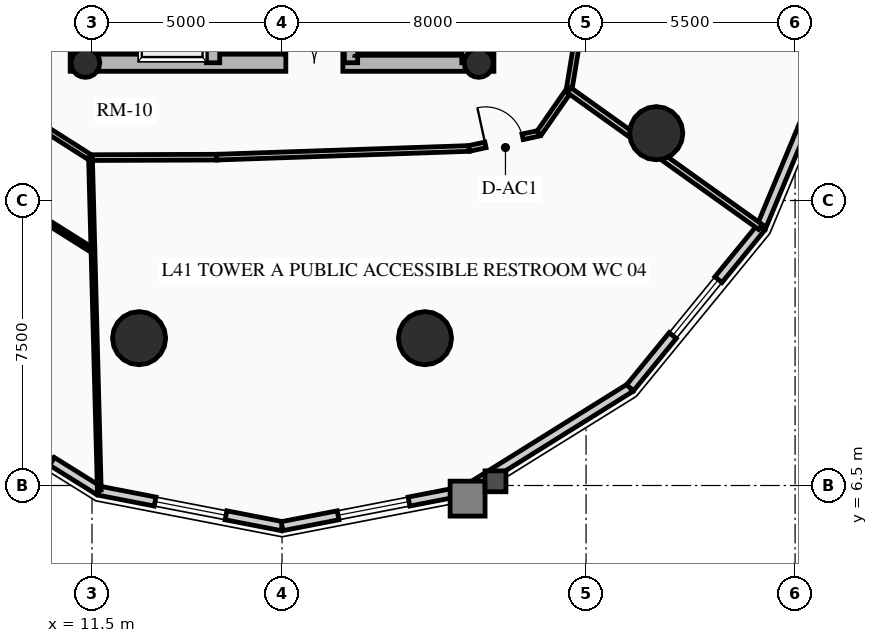
"""IFC4 building model, lengths in metres.
Left out: names, types, materials, properties, quantities, classifications, styles, units other than length and angle.
Written with IfcOpenShell. Run it as: python <this file> out.ifc"""

import sys

from ifc_helpers import new_model, si_unit, direction, frame, frame_2d, origin, origin_2d, place, context, subcontext, project, spatial, rectangle, circle, hollow_circle, extrude, source, transform, mapped, element, fill, save


model = new_model("IFC4")
c1 = context("Model", 3, precision=1e-05, world=origin(), true_north=direction((0.0, 1.0)))
c2 = subcontext(c1, "Body", "Model", "MODEL_VIEW")
j1 = project(units=[si_unit("LENGTHUNIT", "METRE"), si_unit("PLANEANGLEUNIT", "RADIAN")], contexts=[c1])
p1 = place(None, origin())
s1 = spatial("IfcSite", under=j1, at=p1, CompositionType="ELEMENT")
p2 = place(p1, origin())
s2 = spatial("IfcBuilding", under=s1, at=p2, CompositionType="ELEMENT")
p3 = place(p2, frame((0.0, 0.0, 129.16)))
s3 = spatial("IfcBuildingStorey", under=s2, at=p3, CompositionType="ELEMENT", Elevation=129.16)
for number, where, z_axis, x_axis in (
    (1, (11.15, 17.4, 0.0), (0.0, 0.0, 1.0), (0.0, 1.0, 0.0)),
    (2, (21.85, 17.4, 0.0), (0.0, 0.0, 1.0), (0.0, 1.0, 0.0)),
):
    element("IfcWall", number, at=place(p3, frame(where, z_axis=z_axis, x_axis=x_axis)), inside=s3, PredefinedType="SHEAR", context=c2, shape_type="SweptSolid", body=[
        extrude(rectangle(XDim=14.2, YDim=0.45, at=frame_2d((7.1, 0.0))), origin(), (0.0, 0.0, 1.0), 3.72),
    ])
p4 = place(p3, frame((11.15, 17.625, 0.0), z_axis=(0.0, 0.0, 1.0), x_axis=(1.0, 0.0, 0.0)))
e3 = element("IfcWall", 3, at=p4, inside=s3, PredefinedType="SHEAR", context=c2, shape_type="SweptSolid", body=[
    extrude(rectangle(XDim=10.7, YDim=0.45, at=frame_2d((5.35, 0.0))), origin(), (0.0, 0.0, 1.0), 3.72),
])
m1 = source(origin(), c2, "Body", "SweptSolid", [
    extrude(rectangle(XDim=1.5, YDim=2.02, at=frame_2d((0.75, 1.01))), frame((0.0, 0.235, 0.0), z_axis=(0.0, -1.0, 0.0), x_axis=(1.0, 0.0, 0.0)), (0.0, 0.0, 1.0), 0.47),
])
p5 = place(p4, frame((5.45, 0.0, 0.0)))
e4 = element("IfcOpeningElement", 4, at=p5, cuts=e3, PredefinedType="OPENING", context=c2, shape_type="MappedRepresentation", body=[
    mapped(m1, transform((0.0, 0.0, 0.0), x_axis=(1.0, 0.0, 0.0), y_axis=(0.0, 1.0, 0.0), z_axis=(0.0, 0.0, 1.0), scale=1.0)),
])
p6 = place(p3, frame((14.685, 17.625, 0.0), z_axis=(0.0, 0.0, 1.0), x_axis=(0.0, 1.0, 0.0)))
e5 = element("IfcWall", 5, at=p6, inside=s3, PredefinedType="SHEAR", context=c2, shape_type="SweptSolid", body=[
    extrude(rectangle(XDim=13.75, YDim=0.35, at=frame_2d((6.875, 0.0))), origin(), (0.0, 0.0, 1.0), 3.72),
])
m2 = source(origin(), c2, "Body", "SweptSolid", [
    extrude(rectangle(XDim=1.1, YDim=2.015, at=frame_2d((0.55, 1.007))), frame((0.0, 0.185, 0.0), z_axis=(0.0, -1.0, 0.0), x_axis=(1.0, 0.0, 0.0)), (0.0, 0.0, 1.0), 0.37),
])
p7 = place(p6, frame((4.875, 0.0, 0.0)))
e6 = element("IfcOpeningElement", 6, at=p7, cuts=e5, PredefinedType="OPENING", context=c2, shape_type="MappedRepresentation", body=[
    mapped(m2, transform((0.0, 0.0, 0.0), x_axis=(1.0, 0.0, 0.0), y_axis=(0.0, 1.0, 0.0), z_axis=(0.0, 0.0, 1.0), scale=1.0)),
])
p8 = place(p6, frame((0.65, 0.0, 0.0)))
e7 = element("IfcOpeningElement", 7, at=p8, cuts=e5, PredefinedType="OPENING", context=c2, shape_type="MappedRepresentation", body=[
    mapped(m2, transform((0.0, 0.0, 0.0), x_axis=(1.0, 0.0, 0.0), y_axis=(0.0, 1.0, 0.0), z_axis=(0.0, 0.0, 1.0), scale=1.0)),
])
p9 = place(p6, frame((2.65, 0.0, 0.0)))
e8 = element("IfcOpeningElement", 8, at=p9, cuts=e5, PredefinedType="OPENING", context=c2, shape_type="MappedRepresentation", body=[
    mapped(m2, transform((0.0, 0.0, 0.0), x_axis=(1.0, 0.0, 0.0), y_axis=(0.0, 1.0, 0.0), z_axis=(0.0, 0.0, 1.0), scale=1.0)),
])
m3 = source(origin(), c2, "Body", "SweptSolid", [
    extrude(rectangle(XDim=1.15, YDim=2.02, at=frame_2d((0.575, 1.01))), frame((0.0, 0.185, 0.0), z_axis=(0.0, -1.0, 0.0), x_axis=(1.0, 0.0, 0.0)), (0.0, 0.0, 1.0), 0.37),
])
p10 = place(p6, frame((7.295, 0.0, 0.0)))
e9 = element("IfcOpeningElement", 9, at=p10, cuts=e5, PredefinedType="OPENING", context=c2, shape_type="MappedRepresentation", body=[
    mapped(m3, transform((0.0, 0.0, 0.0), x_axis=(1.0, 0.0, 0.0), y_axis=(0.0, 1.0, 0.0), z_axis=(0.0, 0.0, 1.0), scale=1.0)),
])
p11 = place(p3, frame((18.315, 17.625, 0.0), z_axis=(0.0, 0.0, 1.0), x_axis=(0.0, 1.0, 0.0)))
e10 = element("IfcWall", 10, at=p11, inside=s3, PredefinedType="SHEAR", context=c2, shape_type="SweptSolid", body=[
    extrude(rectangle(XDim=13.75, YDim=0.35, at=frame_2d((6.875, 0.0))), origin(), (0.0, 0.0, 1.0), 3.72),
])
p12 = place(p11, frame((10.0, 0.0, 0.0)))
e11 = element("IfcOpeningElement", 11, at=p12, cuts=e10, PredefinedType="OPENING", context=c2, shape_type="MappedRepresentation", body=[
    mapped(m2, transform((0.0, 0.0, 0.0), x_axis=(1.0, 0.0, 0.0), y_axis=(0.0, 1.0, 0.0), z_axis=(0.0, 0.0, 1.0), scale=1.0)),
])
p13 = place(p11, frame((12.0, 0.0, 0.0)))
e12 = element("IfcOpeningElement", 12, at=p13, cuts=e10, PredefinedType="OPENING", context=c2, shape_type="MappedRepresentation", body=[
    mapped(m2, transform((0.0, 0.0, 0.0), x_axis=(1.0, 0.0, 0.0), y_axis=(0.0, 1.0, 0.0), z_axis=(0.0, 0.0, 1.0), scale=1.0)),
])
p14 = place(p11, frame((5.305, 0.0, 0.0)))
e13 = element("IfcOpeningElement", 13, at=p14, cuts=e10, PredefinedType="OPENING", context=c2, shape_type="MappedRepresentation", body=[
    mapped(m3, transform((0.0, 0.0, 0.0), x_axis=(1.0, 0.0, 0.0), y_axis=(0.0, 1.0, 0.0), z_axis=(0.0, 0.0, 1.0), scale=1.0)),
])
p15 = place(p3, frame((21.405, 17.625, 0.0), z_axis=(0.0, 0.0, 1.0), x_axis=(0.0, 1.0, 0.0)))
e14 = element("IfcWall", 14, at=p15, inside=s3, PredefinedType="SHEAR", context=c2, shape_type="SweptSolid", body=[
    extrude(rectangle(XDim=6.72, YDim=0.35, at=frame_2d((3.36, 0.0))), origin(), (0.0, 0.0, 1.0), 3.72),
])
for number, where, z_axis, x_axis in (
    (15, (11.325, 17.62, 0.0), (0.0, 0.0, 1.0), (1.0, 0.0, 0.0)),
    (16, (21.675, 17.62, 0.0), (0.0, 0.0, 1.0), (1.0, 0.0, 0.0)),
):
    element("IfcColumn", number, at=place(p3, frame(where, z_axis=z_axis, x_axis=x_axis)), inside=s3, PredefinedType="COLUMN", context=c2, shape_type="SweptSolid", body=[
        extrude(hollow_circle(Radius=0.38, WallThickness=0.032, at=origin_2d()), origin(), (0.0, 0.0, 1.0), 3.72),
    ])
for number, where, z_axis, x_axis in (
    (17, (12.739, 10.377, 0.0), (0.0, 0.0, 1.0), (1.0, 0.0, 0.0)),
    (18, (20.261, 10.377, 0.0), (0.0, 0.0, 1.0), (1.0, 0.0, 0.0)),
    (19, (26.347, 15.771, 0.0), (0.0, 0.0, 1.0), (1.0, 0.0, 0.0)),
):
    element("IfcColumn", number, at=place(p3, frame(where, z_axis=z_axis, x_axis=x_axis)), inside=s3, PredefinedType="USERDEFINED", context=c2, shape_type="SweptSolid", body=[
        extrude(circle(Radius=0.7, at=origin_2d()), origin(), (0.0, 0.0, 1.0), 3.72),
    ])
p16 = place(p3, frame((11.685, 6.363, 0.0), z_axis=(0.0, 0.0, 1.0), x_axis=(-0.848520380187, 0.529162701263, 0.0)))
e20 = element("IfcWall", 20, at=p16, inside=s3, PredefinedType="SOLIDWALL", context=c2, shape_type="SweptSolid", body=[
    extrude(rectangle(XDim=5.119, YDim=0.24, at=frame_2d((2.56, 0.0))), origin(), (0.0, 0.0, 1.0), 2.949),
])
m4 = source(origin(), c2, "Body", "SweptSolid", [
    extrude(rectangle(XDim=2.2, YDim=1.35, at=frame_2d((1.1, 0.675))), frame((0.0, 0.13, 0.0), z_axis=(0.0, -1.0, 0.0), x_axis=(1.0, 0.0, 0.0)), (0.0, 0.0, 1.0), 0.26),
])
p17 = place(p16, frame((1.459, 0.0, 0.65)))
e21 = element("IfcOpeningElement", 21, at=p17, cuts=e20, PredefinedType="OPENING", context=c2, shape_type="MappedRepresentation", body=[
    mapped(m4, transform((0.0, 0.0, 0.0), x_axis=(1.0, 0.0, 0.0), y_axis=(0.0, 1.0, 0.0), z_axis=(0.0, 0.0, 1.0), scale=1.0)),
])
p18 = place(p3, frame((16.5, 5.43, 0.0), z_axis=(0.0, 0.0, 1.0), x_axis=(-0.981723785992, 0.190311344954, 0.0)))
e22 = element("IfcWall", 22, at=p18, inside=s3, PredefinedType="SOLIDWALL", context=c2, shape_type="SweptSolid", body=[
    extrude(rectangle(XDim=4.904, YDim=0.24, at=frame_2d((2.452, 0.0))), origin(), (0.0, 0.0, 1.0), 2.949),
])
m5 = source(origin(), c2, "Body", "SweptSolid", [
    extrude(rectangle(XDim=1.9, YDim=1.35, at=frame_2d((0.95, 0.675))), frame((0.0, 0.13, 0.0), z_axis=(0.0, -1.0, 0.0), x_axis=(1.0, 0.0, 0.0)), (0.0, 0.0, 1.0), 0.26),
])
p19 = place(p18, frame((1.502, 0.0, 0.65)))
e23 = element("IfcOpeningElement", 23, at=p19, cuts=e22, PredefinedType="OPENING", context=c2, shape_type="MappedRepresentation", body=[
    mapped(m5, transform((0.0, 0.0, 0.0), x_axis=(1.0, 0.0, 0.0), y_axis=(0.0, 1.0, 0.0), z_axis=(0.0, 0.0, 1.0), scale=1.0)),
])
p20 = place(p3, frame((21.315, 6.363, 0.0), z_axis=(0.0, 0.0, 1.0), x_axis=(-0.981723785992, -0.190311344954, 0.0)))
e24 = element("IfcWall", 24, at=p20, inside=s3, PredefinedType="SOLIDWALL", context=c2, shape_type="SweptSolid", body=[
    extrude(rectangle(XDim=4.904, YDim=0.24, at=frame_2d((2.452, 0.0))), origin(), (0.0, 0.0, 1.0), 2.949),
])
p21 = place(p20, frame((1.502, 0.0, 0.65)))
e25 = element("IfcOpeningElement", 25, at=p21, cuts=e24, PredefinedType="OPENING", context=c2, shape_type="MappedRepresentation", body=[
    mapped(m5, transform((0.0, 0.0, 0.0), x_axis=(1.0, 0.0, 0.0), y_axis=(0.0, 1.0, 0.0), z_axis=(0.0, 0.0, 1.0), scale=1.0)),
])
p22 = place(p3, frame((25.658, 9.072, 0.0), z_axis=(0.0, 0.0, 1.0), x_axis=(-0.848520380187, -0.529162701263, 0.0)))
e26 = element("IfcWall", 26, at=p22, inside=s3, PredefinedType="SOLIDWALL", context=c2, shape_type="SweptSolid", body=[
    extrude(rectangle(XDim=5.119, YDim=0.24, at=frame_2d((2.56, 0.0))), origin(), (0.0, 0.0, 1.0), 2.949),
])
p23 = place(p3, frame((29.105, 13.291, 0.0), z_axis=(0.0, 0.0, 1.0), x_axis=(-0.632700781152, -0.77439635945, 0.0)))
e27 = element("IfcWall", 27, at=p23, inside=s3, PredefinedType="SOLIDWALL", context=c2, shape_type="SweptSolid", body=[
    extrude(rectangle(XDim=5.448, YDim=0.24, at=frame_2d((2.724, 0.0))), origin(), (0.0, 0.0, 1.0), 2.949),
])
p24 = place(p23, frame((1.774, 0.0, 0.65)))
e28 = element("IfcOpeningElement", 28, at=p24, cuts=e27, PredefinedType="OPENING", context=c2, shape_type="MappedRepresentation", body=[
    mapped(m5, transform((0.0, 0.0, 0.0), x_axis=(1.0, 0.0, 0.0), y_axis=(0.0, 1.0, 0.0), z_axis=(0.0, 0.0, 1.0), scale=1.0)),
])
p25 = place(p3, frame((31.318, 18.607, 0.0), z_axis=(0.0, 0.0, 1.0), x_axis=(-0.384344417632, -0.923189779317, 0.0)))
e29 = element("IfcWall", 29, at=p25, inside=s3, PredefinedType="SOLIDWALL", context=c2, shape_type="SweptSolid", body=[
    extrude(rectangle(XDim=5.758, YDim=0.24, at=frame_2d((2.879, 0.0))), origin(), (0.0, 0.0, 1.0), 2.949),
])
p26 = place(p3, frame((10.115, 15.983, 0.0), z_axis=(0.0, 0.0, 1.0), x_axis=(0.843995849351, -0.536349705209, 0.0)))
e30 = element("IfcWall", 30, at=p26, inside=s3, PredefinedType="PARTITIONING", context=c2, shape_type="SweptSolid", body=[
    extrude(rectangle(XDim=1.593, YDim=0.15, at=frame_2d((0.796, 0.0))), origin(), (0.0, 0.0, 1.0), 2.995),
])
p27 = place(p3, frame((11.46, 15.129, 0.0), z_axis=(0.0, 0.0, 1.0), x_axis=(0.999993513287, 0.003601858435, 0.0)))
e31 = element("IfcWall", 31, at=p27, inside=s3, PredefinedType="PARTITIONING", context=c2, shape_type="SweptSolid", body=[
    extrude(rectangle(XDim=3.321, YDim=0.15, at=frame_2d((1.661, 0.0))), origin(), (0.0, 0.0, 1.0), 2.995),
])
p28 = place(p3, frame((14.781, 15.141, 0.0), z_axis=(0.0, 0.0, 1.0), x_axis=(0.999407918707, 0.034406569513, 0.0)))
e32 = element("IfcWall", 32, at=p28, inside=s3, PredefinedType="PARTITIONING", context=c2, shape_type="SweptSolid", body=[
    extrude(rectangle(XDim=6.642, YDim=0.15, at=frame_2d((3.321, 0.0))), origin(), (0.0, 0.0, 1.0), 2.995),
])
p29 = place(p3, frame((21.419, 15.369, 0.0), z_axis=(0.0, 0.0, 1.0), x_axis=(0.977192701953, 0.212354475464, 0.0)))
e33 = element("IfcWall", 33, at=p29, inside=s3, PredefinedType="PARTITIONING", context=c2, shape_type="SweptSolid", body=[
    extrude(rectangle(XDim=1.888, YDim=0.15, at=frame_2d((0.944, 0.0))), origin(), (0.0, 0.0, 1.0), 2.995),
])
m6 = source(origin(), c2, "Body", "SweptSolid", [
    extrude(rectangle(XDim=1.0, YDim=2.015, at=frame_2d((0.5, 1.007))), frame((0.0, 0.085, 0.0), z_axis=(0.0, -1.0, 0.0), x_axis=(1.0, 0.0, 0.0)), (0.0, 0.0, 1.0), 0.17),
])
p30 = place(p29, frame((0.444, 0.0, 0.0)))
e34 = element("IfcOpeningElement", 34, at=p30, cuts=e33, PredefinedType="OPENING", context=c2, shape_type="MappedRepresentation", body=[
    mapped(m6, transform((0.0, 0.0, 0.0), x_axis=(1.0, 0.0, 0.0), y_axis=(0.0, 1.0, 0.0), z_axis=(0.0, 0.0, 1.0), scale=1.0)),
])
p31 = place(p3, frame((23.263, 15.77, 0.0), z_axis=(0.0, 0.0, 1.0), x_axis=(0.570743456919, 0.821128434768, 0.0)))
e35 = element("IfcWall", 35, at=p31, inside=s3, PredefinedType="PARTITIONING", context=c2, shape_type="SweptSolid", body=[
    extrude(rectangle(XDim=1.382, YDim=0.15, at=frame_2d((0.691, 0.0))), origin(), (0.0, 0.0, 1.0), 2.995),
])
p32 = place(p3, frame((24.052, 16.905, 0.0), z_axis=(0.0, 0.0, 1.0), x_axis=(0.162091534225, 0.986775726562, 0.0)))
e36 = element("IfcWall", 36, at=p32, inside=s3, PredefinedType="PARTITIONING", context=c2, shape_type="SweptSolid", body=[
    extrude(rectangle(XDim=1.613, YDim=0.15, at=frame_2d((0.807, 0.0))), origin(), (0.0, 0.0, 1.0), 2.995),
])
p33 = place(p3, frame((11.46, 15.129, 0.0), z_axis=(0.0, 0.0, 1.0), x_axis=(0.026480592098, -0.999649327636, 0.0)))
e37 = element("IfcWall", 37, at=p33, inside=s3, PredefinedType="MOVABLE", context=c2, shape_type="SweptSolid", body=[
    extrude(rectangle(XDim=8.75, YDim=0.1, at=frame_2d((4.375, 0.0))), origin(), (0.0, 0.0, 1.0), 2.949),
])
p34 = place(p3, frame((24.052, 16.905, 0.0), z_axis=(0.0, 0.0, 1.0), x_axis=(0.813437670746, -0.581652091727, 0.0)))
e38 = element("IfcWall", 38, at=p34, inside=s3, PredefinedType="PARTITIONING", context=c2, shape_type="SweptSolid", body=[
    extrude(rectangle(XDim=6.192, YDim=0.16, at=frame_2d((3.096, 0.0))), origin(), (0.0, 0.0, 1.0), 2.949),
])
p35 = place(p3, frame((9.342, 14.052, 0.0), z_axis=(0.0, 0.0, 1.0), x_axis=(0.846526826244, -0.532346064557, 0.0)))
e39 = element("IfcWall", 39, at=p35, inside=s3, PredefinedType="PARTITIONING", context=c2, shape_type="SweptSolid", body=[
    extrude(rectangle(XDim=2.578, YDim=0.125, at=frame_2d((1.289, 0.0))), origin(), (0.0, 0.0, 1.0), 2.995),
])
m7 = source(origin(), c2, "Body", "SweptSolid", [
    extrude(rectangle(XDim=2.2, YDim=1.35, at=frame_2d((1.1, 0.675))), frame((0.0, 0.03, 0.0), z_axis=(0.0, -1.0, 0.0), x_axis=(1.0, 0.0, 0.0)), (0.0, 0.0, 1.0), 0.06),
])
p36 = place(p17, origin())
e40 = element("IfcWindow", 40, at=p36, inside=s3, PartitioningType="DOUBLE_PANEL_VERTICAL", PredefinedType="WINDOW", context=c2, shape_type="MappedRepresentation", body=[
    mapped(m7, transform((0.0, 0.0, 0.0), x_axis=(1.0, 0.0, 0.0), y_axis=(0.0, 1.0, 0.0), z_axis=(0.0, 0.0, 1.0), scale=1.0)),
])
fill(e21, e40)
m8 = source(origin(), c2, "Body", "SweptSolid", [
    extrude(rectangle(XDim=1.9, YDim=1.35, at=frame_2d((0.95, 0.675))), frame((0.0, 0.03, 0.0), z_axis=(0.0, -1.0, 0.0), x_axis=(1.0, 0.0, 0.0)), (0.0, 0.0, 1.0), 0.06),
])
p37 = place(p19, origin())
e41 = element("IfcWindow", 41, at=p37, inside=s3, PartitioningType="DOUBLE_PANEL_VERTICAL", PredefinedType="WINDOW", context=c2, shape_type="MappedRepresentation", body=[
    mapped(m8, transform((0.0, 0.0, 0.0), x_axis=(1.0, 0.0, 0.0), y_axis=(0.0, 1.0, 0.0), z_axis=(0.0, 0.0, 1.0), scale=1.0)),
])
fill(e23, e41)
p38 = place(p21, origin())
e42 = element("IfcWindow", 42, at=p38, inside=s3, PartitioningType="DOUBLE_PANEL_VERTICAL", PredefinedType="WINDOW", context=c2, shape_type="MappedRepresentation", body=[
    mapped(m8, transform((0.0, 0.0, 0.0), x_axis=(1.0, 0.0, 0.0), y_axis=(0.0, 1.0, 0.0), z_axis=(0.0, 0.0, 1.0), scale=1.0)),
])
fill(e25, e42)
p39 = place(p24, origin())
e43 = element("IfcWindow", 43, at=p39, inside=s3, PartitioningType="DOUBLE_PANEL_VERTICAL", PredefinedType="WINDOW", context=c2, shape_type="MappedRepresentation", body=[
    mapped(m8, transform((0.0, 0.0, 0.0), x_axis=(1.0, 0.0, 0.0), y_axis=(0.0, 1.0, 0.0), z_axis=(0.0, 0.0, 1.0), scale=1.0)),
])
fill(e28, e43)
m9 = source(origin(), c2, "Body", "SweptSolid", [
    extrude(rectangle(XDim=1.5, YDim=2.02, at=frame_2d((0.75, 1.01))), frame((0.0, 0.025, 0.0), z_axis=(0.0, -1.0, 0.0), x_axis=(1.0, 0.0, 0.0)), (0.0, 0.0, 1.0), 0.05),
])
p40 = place(p5, origin())
e44 = element("IfcDoor", 44, at=p40, inside=s3, OperationType="DOUBLE_DOOR_SINGLE_SWING", PredefinedType="DOOR", context=c2, shape_type="MappedRepresentation", body=[
    mapped(m9, transform((0.0, 0.0, 0.0), x_axis=(1.0, 0.0, 0.0), y_axis=(0.0, 1.0, 0.0), z_axis=(0.0, 0.0, 1.0), scale=1.0)),
])
fill(e4, e44)
m10 = source(origin(), c2, "Body", "SweptSolid", [
    extrude(rectangle(XDim=1.0, YDim=2.015, at=frame_2d((0.5, 1.007))), frame((0.0, 0.025, 0.0), z_axis=(0.0, -1.0, 0.0), x_axis=(1.0, 0.0, 0.0)), (0.0, 0.0, 1.0), 0.05),
])
p41 = place(p30, origin())
e45 = element("IfcDoor", 45, at=p41, inside=s3, OperationType="SINGLE_SWING_LEFT", PredefinedType="DOOR", context=c2, shape_type="MappedRepresentation", body=[
    mapped(m10, transform((0.0, 0.0, 0.0), x_axis=(1.0, 0.0, 0.0), y_axis=(0.0, 1.0, 0.0), z_axis=(0.0, 0.0, 1.0), scale=1.0)),
])
fill(e34, e45)
save(model, sys.argv[1])
